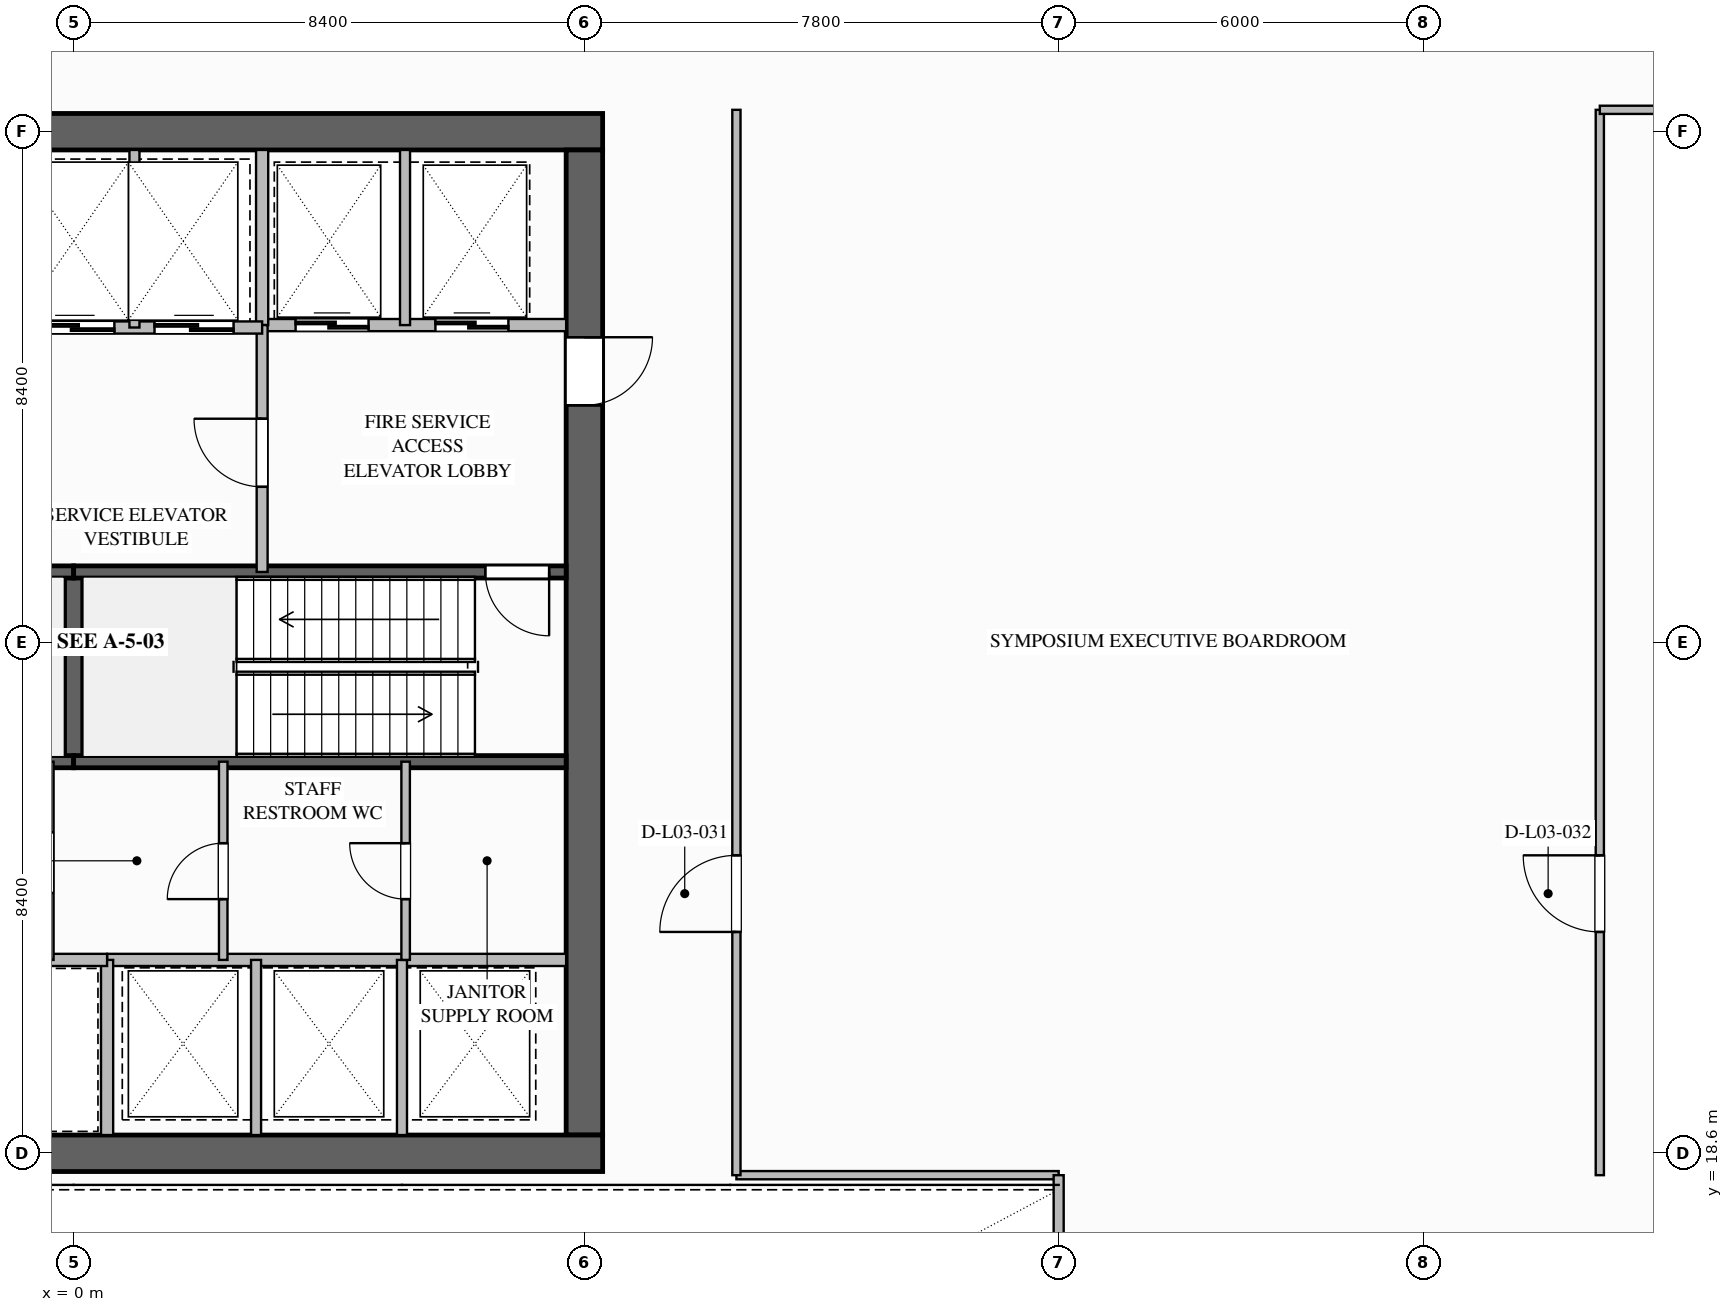
"""IFC4 building model, lengths in metres.
Left out: names, types, materials, properties, quantities, classifications, styles, units other than length and angle.
Written with IfcOpenShell. Run it as: python <this file> out.ifc"""

import sys

from ifc_helpers import new_model, si_unit, direction, frame, frame_2d, origin, place, context, subcontext, project, spatial, rectangle, extrude, element, fill, save


model = new_model("IFC4")
c1 = context("Model", 3, precision=1e-05, world=origin(), true_north=direction((0.0, 1.0)))
c2 = subcontext(c1, "Body", "Model", "MODEL_VIEW")
j1 = project(units=[si_unit("LENGTHUNIT", "METRE"), si_unit("PLANEANGLEUNIT", "RADIAN")], contexts=[c1])
p1 = place(None, origin())
s1 = spatial("IfcSite", under=j1, at=p1, CompositionType="ELEMENT")
p2 = place(p1, origin())
s2 = spatial("IfcBuilding", under=s1, at=p2, CompositionType="ELEMENT")
p3 = place(p2, frame((0.0, 0.0, 17.2)))
s3 = spatial("IfcBuildingStorey", under=s2, at=p3, CompositionType="ELEMENT", Elevation=17.2)
p4 = place(p3, frame((-8.7, 35.4, 0.0), z_axis=(0.0, 0.0, 1.0), x_axis=(1.0, 0.0, 0.0)))
e1 = element("IfcWall", 1, at=p4, inside=s3, PredefinedType="SHEAR", context=c2, shape_type="SweptSolid", body=[
    extrude(rectangle(XDim=17.4, YDim=0.6, at=frame_2d((8.7, 0.0))), origin(), (0.0, 0.0, 1.0), 5.2),
])
p5 = place(p3, frame((8.4, 35.1, 0.0), z_axis=(0.0, 0.0, 1.0), x_axis=(0.0, -1.0, 0.0)))
e2 = element("IfcWall", 2, at=p5, inside=s3, PredefinedType="SHEAR", context=c2, shape_type="SweptSolid", body=[
    extrude(rectangle(XDim=16.2, YDim=0.6, at=frame_2d((8.1, 0.0))), origin(), (0.0, 0.0, 1.0), 5.2),
])
p6 = place(p5, frame((3.08, 0.0, 0.0)))
e3 = element("IfcOpeningElement", 3, at=p6, cuts=e2, PredefinedType="OPENING", context=c2, shape_type="SweptSolid", body=[
    extrude(rectangle(XDim=1.12, YDim=2.1, at=frame_2d((0.56, 1.05))), frame((0.0, 0.31, 0.0), z_axis=(0.0, -1.0, 0.0), x_axis=(1.0, 0.0, 0.0)), (0.0, 0.0, 1.0), 0.62),
])
p7 = place(p3, frame((8.7, 18.6, 0.0), z_axis=(0.0, 0.0, 1.0), x_axis=(-1.0, 0.0, 0.0)))
e4 = element("IfcWall", 4, at=p7, inside=s3, PredefinedType="SHEAR", context=c2, shape_type="SweptSolid", body=[
    extrude(rectangle(XDim=17.4, YDim=0.6, at=frame_2d((8.7, 0.0))), origin(), (0.0, 0.0, 1.0), 5.2),
])
p8 = place(p3, frame((0.0, 25.04, 0.0), z_axis=(0.0, 0.0, 1.0), x_axis=(0.0, 1.0, 0.0)))
e5 = element("IfcWall", 5, at=p8, inside=s3, PredefinedType="SOLIDWALL", context=c2, shape_type="SweptSolid", body=[
    extrude(rectangle(XDim=3.12, YDim=0.3, at=frame_2d((1.56, 0.0))), origin(), (0.0, 0.0, 1.0), 4.9),
])
p9 = place(p3, frame((-8.1, 25.04, 0.0), z_axis=(0.0, 0.0, 1.0), x_axis=(1.0, 0.0, 0.0)))
e6 = element("IfcWall", 6, at=p9, inside=s3, PredefinedType="SOLIDWALL", context=c2, shape_type="SweptSolid", body=[
    extrude(rectangle(XDim=8.1, YDim=0.2, at=frame_2d((4.05, 0.0))), origin(), (0.0, 0.0, 1.0), 4.9),
])
p10 = place(p9, frame((0.28, 0.0, 0.0)))
e7 = element("IfcOpeningElement", 7, at=p10, cuts=e6, PredefinedType="OPENING", context=c2, shape_type="SweptSolid", body=[
    extrude(rectangle(XDim=1.05, YDim=2.1, at=frame_2d((0.525, 1.05))), frame((0.0, 0.11, 0.0), z_axis=(0.0, -1.0, 0.0), x_axis=(1.0, 0.0, 0.0)), (0.0, 0.0, 1.0), 0.22),
])
for number, where, z_axis, x_axis in (
    (8, (-8.1, 28.16, 0.0), (0.0, 0.0, 1.0), (1.0, 0.0, 0.0)),
    (9, (0.0, 25.04, 0.0), (0.0, 0.0, 1.0), (1.0, 0.0, 0.0)),
):
    element("IfcWall", number, at=place(p3, frame(where, z_axis=z_axis, x_axis=x_axis)), inside=s3, PredefinedType="SOLIDWALL", context=c2, shape_type="SweptSolid", body=[
        extrude(rectangle(XDim=8.1, YDim=0.2, at=frame_2d((4.05, 0.0))), origin(), (0.0, 0.0, 1.0), 4.9),
    ])
p11 = place(p3, frame((8.1, 28.16, 0.0), z_axis=(0.0, 0.0, 1.0), x_axis=(-1.0, 0.0, 0.0)))
e10 = element("IfcWall", 10, at=p11, inside=s3, PredefinedType="SOLIDWALL", context=c2, shape_type="SweptSolid", body=[
    extrude(rectangle(XDim=8.1, YDim=0.2, at=frame_2d((4.05, 0.0))), origin(), (0.0, 0.0, 1.0), 4.9),
])
p12 = place(p11, frame((0.28, 0.0, 0.0)))
e11 = element("IfcOpeningElement", 11, at=p12, cuts=e10, PredefinedType="OPENING", context=c2, shape_type="SweptSolid", body=[
    extrude(rectangle(XDim=1.05, YDim=2.1, at=frame_2d((0.525, 1.05))), frame((0.0, 0.11, 0.0), z_axis=(0.0, -1.0, 0.0), x_axis=(1.0, 0.0, 0.0)), (0.0, 0.0, 1.0), 0.22),
])
p13 = place(p3, frame((3.1, 32.22, 0.0), z_axis=(0.0, 0.0, 1.0), x_axis=(1.0, 0.0, 0.0)))
e12 = element("IfcWall", 12, at=p13, inside=s3, PredefinedType="SOLIDWALL", context=c2, shape_type="SweptSolid", body=[
    extrude(rectangle(XDim=5.0, YDim=0.2, at=frame_2d((2.5, 0.0))), origin(), (0.0, 0.0, 1.0), 4.9),
])
p14 = place(p13, frame((0.55, 0.0, 0.0)))
e13 = element("IfcOpeningElement", 13, at=p14, cuts=e12, PredefinedType="OPENING", context=c2, shape_type="SweptSolid", body=[
    extrude(rectangle(XDim=1.2, YDim=2.2, at=frame_2d((0.6, 1.1))), frame((0.0, 0.11, 0.0), z_axis=(0.0, -1.0, 0.0), x_axis=(1.0, 0.0, 0.0)), (0.0, 0.0, 1.0), 0.22),
])
p15 = place(p13, frame((2.85, 0.0, 0.0)))
e14 = element("IfcOpeningElement", 14, at=p15, cuts=e12, PredefinedType="OPENING", context=c2, shape_type="SweptSolid", body=[
    extrude(rectangle(XDim=1.2, YDim=2.2, at=frame_2d((0.6, 1.1))), frame((0.0, 0.11, 0.0), z_axis=(0.0, -1.0, 0.0), x_axis=(1.0, 0.0, 0.0)), (0.0, 0.0, 1.0), 0.22),
])
p16 = place(p3, frame((3.1, 32.22, 0.0), z_axis=(0.0, 0.0, 1.0), x_axis=(0.0, 1.0, 0.0)))
e15 = element("IfcWall", 15, at=p16, inside=s3, PredefinedType="SOLIDWALL", context=c2, shape_type="SweptSolid", body=[
    extrude(rectangle(XDim=2.88, YDim=0.2, at=frame_2d((1.44, 0.0))), origin(), (0.0, 0.0, 1.0), 4.9),
])
p17 = place(p3, frame((5.45, 32.22, 0.0), z_axis=(0.0, 0.0, 1.0), x_axis=(0.0, 1.0, 0.0)))
e16 = element("IfcWall", 16, at=p17, inside=s3, PredefinedType="PARTITIONING", context=c2, shape_type="SweptSolid", body=[
    extrude(rectangle(XDim=2.88, YDim=0.165, at=frame_2d((1.44, 0.0))), origin(), (0.0, 0.0, 1.0), 4.9),
])
p18 = place(p3, frame((3.1, 28.16, 0.0), z_axis=(0.0, 0.0, 1.0), x_axis=(0.0, 1.0, 0.0)))
e17 = element("IfcWall", 17, at=p18, inside=s3, PredefinedType="SOLIDWALL", context=c2, shape_type="SweptSolid", body=[
    extrude(rectangle(XDim=4.06, YDim=0.18, at=frame_2d((2.03, 0.0))), origin(), (0.0, 0.0, 1.0), 4.9),
])
p19 = place(p18, frame((1.4, 0.0, 0.0)))
e18 = element("IfcOpeningElement", 18, at=p19, cuts=e17, PredefinedType="OPENING", context=c2, shape_type="SweptSolid", body=[
    extrude(rectangle(XDim=1.12, YDim=2.1, at=frame_2d((0.56, 1.05))), frame((0.0, 0.1, 0.0), z_axis=(0.0, -1.0, 0.0), x_axis=(1.0, 0.0, 0.0)), (0.0, 0.0, 1.0), 0.2),
])
p20 = place(p3, frame((-1.0, 32.18, 0.0), z_axis=(0.0, 0.0, 1.0), x_axis=(1.0, 0.0, 0.0)))
e19 = element("IfcWall", 19, at=p20, inside=s3, PredefinedType="SOLIDWALL", context=c2, shape_type="SweptSolid", body=[
    extrude(rectangle(XDim=4.1, YDim=0.2, at=frame_2d((2.05, 0.0))), origin(), (0.0, 0.0, 1.0), 4.9),
])
p21 = place(p20, frame((0.37, 0.0, 0.0)))
e20 = element("IfcOpeningElement", 20, at=p21, cuts=e19, PredefinedType="OPENING", context=c2, shape_type="SweptSolid", body=[
    extrude(rectangle(XDim=1.3, YDim=2.2, at=frame_2d((0.65, 1.1))), frame((0.0, 0.11, 0.0), z_axis=(0.0, -1.0, 0.0), x_axis=(1.0, 0.0, 0.0)), (0.0, 0.0, 1.0), 0.22),
])
p22 = place(p20, frame((2.33, 0.0, 0.0)))
e21 = element("IfcOpeningElement", 21, at=p22, cuts=e19, PredefinedType="OPENING", context=c2, shape_type="SweptSolid", body=[
    extrude(rectangle(XDim=1.3, YDim=2.2, at=frame_2d((0.65, 1.1))), frame((0.0, 0.11, 0.0), z_axis=(0.0, -1.0, 0.0), x_axis=(1.0, 0.0, 0.0)), (0.0, 0.0, 1.0), 0.22),
])
p23 = place(p3, frame((1.0, 32.18, 0.0), z_axis=(0.0, 0.0, 1.0), x_axis=(0.0, 1.0, 0.0)))
e22 = element("IfcWall", 22, at=p23, inside=s3, PredefinedType="PARTITIONING", context=c2, shape_type="SweptSolid", body=[
    extrude(rectangle(XDim=2.92, YDim=0.165, at=frame_2d((1.46, 0.0))), origin(), (0.0, 0.0, 1.0), 4.9),
])
p24 = place(p3, frame((8.1, 21.78, 0.0), z_axis=(0.0, 0.0, 1.0), x_axis=(-1.0, 0.0, 0.0)))
e23 = element("IfcWall", 23, at=p24, inside=s3, PredefinedType="SOLIDWALL", context=c2, shape_type="SweptSolid", body=[
    extrude(rectangle(XDim=7.55, YDim=0.2, at=frame_2d((3.775, 0.0))), origin(), (0.0, 0.0, 1.0), 4.9),
])
p25 = place(p3, frame((0.55, 18.9, 0.0), z_axis=(0.0, 0.0, 1.0), x_axis=(0.0, 1.0, 0.0)))
e24 = element("IfcWall", 24, at=p25, inside=s3, PredefinedType="SOLIDWALL", context=c2, shape_type="SweptSolid", body=[
    extrude(rectangle(XDim=2.88, YDim=0.2, at=frame_2d((1.44, 0.0))), origin(), (0.0, 0.0, 1.0), 4.9),
])
for number, where, z_axis, x_axis in (
    (25, (3.0, 18.9, 0.0), (0.0, 0.0, 1.0), (0.0, 1.0, 0.0)),
    (26, (5.4, 18.9, 0.0), (0.0, 0.0, 1.0), (0.0, 1.0, 0.0)),
):
    element("IfcWall", number, at=place(p3, frame(where, z_axis=z_axis, x_axis=x_axis)), inside=s3, PredefinedType="PARTITIONING", context=c2, shape_type="SweptSolid", body=[
        extrude(rectangle(XDim=2.88, YDim=0.165, at=frame_2d((1.44, 0.0))), origin(), (0.0, 0.0, 1.0), 4.9),
    ])
p26 = place(p3, frame((-0.55, 21.78, 0.0), z_axis=(0.0, 0.0, 1.0), x_axis=(1.0, 0.0, 0.0)))
e27 = element("IfcWall", 27, at=p26, inside=s3, PredefinedType="SOLIDWALL", context=c2, shape_type="SweptSolid", body=[
    extrude(rectangle(XDim=1.1, YDim=0.2, at=frame_2d((0.55, 0.0))), origin(), (0.0, 0.0, 1.0), 4.9),
])
p27 = place(p3, frame((-0.42, 21.78, 0.0), z_axis=(0.0, 0.0, 1.0), x_axis=(0.0, 1.0, 0.0)))
e28 = element("IfcWall", 28, at=p27, inside=s3, PredefinedType="SOLIDWALL", context=c2, shape_type="SweptSolid", body=[
    extrude(rectangle(XDim=3.26, YDim=0.18, at=frame_2d((1.63, 0.0))), origin(), (0.0, 0.0, 1.0), 4.9),
])
p28 = place(p27, frame((1.1, 0.0, 0.0)))
e29 = element("IfcOpeningElement", 29, at=p28, cuts=e28, PredefinedType="OPENING", context=c2, shape_type="SweptSolid", body=[
    extrude(rectangle(XDim=1.0, YDim=2.1, at=frame_2d((0.5, 1.05))), frame((0.0, 0.1, 0.0), z_axis=(0.0, -1.0, 0.0), x_axis=(1.0, 0.0, 0.0)), (0.0, 0.0, 1.0), 0.2),
])
p29 = place(p3, frame((2.46, 21.78, 0.0), z_axis=(0.0, 0.0, 1.0), x_axis=(0.0, 1.0, 0.0)))
e30 = element("IfcWall", 30, at=p29, inside=s3, PredefinedType="PLUMBINGWALL", context=c2, shape_type="SweptSolid", body=[
    extrude(rectangle(XDim=3.26, YDim=0.14, at=frame_2d((1.63, 0.0))), origin(), (0.0, 0.0, 1.0), 4.9),
])
p30 = place(p29, frame((1.0, 0.0, 0.0)))
e31 = element("IfcOpeningElement", 31, at=p30, cuts=e30, PredefinedType="OPENING", context=c2, shape_type="SweptSolid", body=[
    extrude(rectangle(XDim=0.92, YDim=2.1, at=frame_2d((0.46, 1.05))), frame((0.0, 0.08, 0.0), z_axis=(0.0, -1.0, 0.0), x_axis=(1.0, 0.0, 0.0)), (0.0, 0.0, 1.0), 0.16),
])
p31 = place(p3, frame((5.46, 21.78, 0.0), z_axis=(0.0, 0.0, 1.0), x_axis=(0.0, 1.0, 0.0)))
e32 = element("IfcWall", 32, at=p31, inside=s3, PredefinedType="PLUMBINGWALL", context=c2, shape_type="SweptSolid", body=[
    extrude(rectangle(XDim=3.26, YDim=0.14, at=frame_2d((1.63, 0.0))), origin(), (0.0, 0.0, 1.0), 4.9),
])
p32 = place(p31, frame((1.0, 0.0, 0.0)))
e33 = element("IfcOpeningElement", 33, at=p32, cuts=e32, PredefinedType="OPENING", context=c2, shape_type="SweptSolid", body=[
    extrude(rectangle(XDim=0.92, YDim=2.1, at=frame_2d((0.46, 1.05))), frame((0.0, 0.08, 0.0), z_axis=(0.0, -1.0, 0.0), x_axis=(1.0, 0.0, 0.0)), (0.0, 0.0, 1.0), 0.16),
])
p33 = place(p3, frame((10.9, 18.24, 0.0), z_axis=(0.0, 0.0, 1.0), x_axis=(1.0, 0.0, 0.0)))
e34 = element("IfcWall", 34, at=p33, inside=s3, PredefinedType="PARTITIONING", context=c2, shape_type="SweptSolid", body=[
    extrude(rectangle(XDim=5.3, YDim=0.135, at=frame_2d((2.65, 0.0))), origin(), (0.0, 0.0, 1.0), 4.9),
])
p34 = place(p3, frame((10.9, 18.24, 0.0), z_axis=(0.0, 0.0, 1.0), x_axis=(0.0, 1.0, 0.0)))
e35 = element("IfcWall", 35, at=p34, inside=s3, PredefinedType="PARTITIONING", context=c2, shape_type="SweptSolid", body=[
    extrude(rectangle(XDim=17.52, YDim=0.135, at=frame_2d((8.76, 0.0))), origin(), (0.0, 0.0, 1.0), 4.9),
])
p35 = place(p34, frame((4.0, 0.0, 0.0)))
e36 = element("IfcOpeningElement", 36, at=p35, cuts=e35, PredefinedType="OPENING", context=c2, shape_type="SweptSolid", body=[
    extrude(rectangle(XDim=1.26, YDim=2.2, at=frame_2d((0.63, 1.1))), frame((0.0, 0.077, 0.0), z_axis=(0.0, -1.0, 0.0), x_axis=(1.0, 0.0, 0.0)), (0.0, 0.0, 1.0), 0.155),
])
p36 = place(p3, frame((25.1, 18.24, 0.0), z_axis=(0.0, 0.0, 1.0), x_axis=(0.0, 1.0, 0.0)))
e37 = element("IfcWall", 37, at=p36, inside=s3, PredefinedType="PARTITIONING", context=c2, shape_type="SweptSolid", body=[
    extrude(rectangle(XDim=17.52, YDim=0.135, at=frame_2d((8.76, 0.0))), origin(), (0.0, 0.0, 1.0), 4.9),
])
p37 = place(p36, frame((4.0, 0.0, 0.0)))
e38 = element("IfcOpeningElement", 38, at=p37, cuts=e37, PredefinedType="OPENING", context=c2, shape_type="SweptSolid", body=[
    extrude(rectangle(XDim=1.26, YDim=2.2, at=frame_2d((0.63, 1.1))), frame((0.0, 0.077, 0.0), z_axis=(0.0, -1.0, 0.0), x_axis=(1.0, 0.0, 0.0)), (0.0, 0.0, 1.0), 0.155),
])
p38 = place(p3, frame((25.1, 35.76, 0.0), z_axis=(0.0, 0.0, 1.0), x_axis=(1.0, 0.0, 0.0)))
e39 = element("IfcWall", 39, at=p38, inside=s3, PredefinedType="PARTITIONING", context=c2, shape_type="SweptSolid", body=[
    extrude(rectangle(XDim=2.45, YDim=0.135, at=frame_2d((1.225, 0.0))), origin(), (0.0, 0.0, 1.0), 4.9),
])
p39 = place(p3, frame((16.2, 0.8, 0.0), z_axis=(0.0, 0.0, 1.0), x_axis=(0.0, 1.0, 0.0)))
e40 = element("IfcWall", 40, at=p39, inside=s3, PredefinedType="PARTITIONING", context=c2, shape_type="SweptSolid", body=[
    extrude(rectangle(XDim=17.44, YDim=0.165, at=frame_2d((8.72, 0.0))), origin(), (0.0, 0.0, 1.0), 3.937),
])
p40 = place(p12, origin())
e41 = element("IfcDoor", 41, at=p40, inside=s3, OperationType="SINGLE_SWING_LEFT", PredefinedType="DOOR", context=c2, shape_type="SweptSolid", body=[
    extrude(rectangle(XDim=1.05, YDim=2.1, at=frame_2d((0.525, 1.05))), frame((0.0, 0.025, 0.0), z_axis=(0.0, -1.0, 0.0), x_axis=(1.0, 0.0, 0.0)), (0.0, 0.0, 1.0), 0.05),
])
fill(e11, e41)
p41 = place(p14, origin())
e42 = element("IfcDoor", 42, at=p41, inside=s3, OperationType="SLIDING_TO_LEFT", PredefinedType="DOOR", context=c2, shape_type="SweptSolid", body=[
    extrude(rectangle(XDim=1.2, YDim=2.2, at=frame_2d((0.6, 1.1))), frame((0.0, 0.025, 0.0), z_axis=(0.0, -1.0, 0.0), x_axis=(1.0, 0.0, 0.0)), (0.0, 0.0, 1.0), 0.05),
])
fill(e13, e42)
p42 = place(p15, origin())
e43 = element("IfcDoor", 43, at=p42, inside=s3, OperationType="SLIDING_TO_LEFT", PredefinedType="DOOR", context=c2, shape_type="SweptSolid", body=[
    extrude(rectangle(XDim=1.2, YDim=2.2, at=frame_2d((0.6, 1.1))), frame((0.0, 0.025, 0.0), z_axis=(0.0, -1.0, 0.0), x_axis=(1.0, 0.0, 0.0)), (0.0, 0.0, 1.0), 0.05),
])
fill(e14, e43)
p43 = place(p19, origin())
e44 = element("IfcDoor", 44, at=p43, inside=s3, OperationType="SINGLE_SWING_RIGHT", PredefinedType="DOOR", context=c2, shape_type="SweptSolid", body=[
    extrude(rectangle(XDim=1.12, YDim=2.1, at=frame_2d((0.56, 1.05))), frame((0.0, 0.025, 0.0), z_axis=(0.0, -1.0, 0.0), x_axis=(1.0, 0.0, 0.0)), (0.0, 0.0, 1.0), 0.05),
])
fill(e18, e44)
p44 = place(p6, origin())
e45 = element("IfcDoor", 45, at=p44, inside=s3, OperationType="SINGLE_SWING_LEFT", PredefinedType="DOOR", context=c2, shape_type="SweptSolid", body=[
    extrude(rectangle(XDim=1.12, YDim=2.1, at=frame_2d((0.56, 1.05))), frame((0.0, 0.025, 0.0), z_axis=(0.0, -1.0, 0.0), x_axis=(1.0, 0.0, 0.0)), (0.0, 0.0, 1.0), 0.05),
])
fill(e3, e45)
p45 = place(p21, origin())
e46 = element("IfcDoor", 46, at=p45, inside=s3, OperationType="SLIDING_TO_LEFT", PredefinedType="DOOR", context=c2, shape_type="SweptSolid", body=[
    extrude(rectangle(XDim=1.3, YDim=2.2, at=frame_2d((0.65, 1.1))), frame((0.0, 0.025, 0.0), z_axis=(0.0, -1.0, 0.0), x_axis=(1.0, 0.0, 0.0)), (0.0, 0.0, 1.0), 0.05),
])
fill(e20, e46)
p46 = place(p22, origin())
e47 = element("IfcDoor", 47, at=p46, inside=s3, OperationType="SLIDING_TO_LEFT", PredefinedType="DOOR", context=c2, shape_type="SweptSolid", body=[
    extrude(rectangle(XDim=1.3, YDim=2.2, at=frame_2d((0.65, 1.1))), frame((0.0, 0.025, 0.0), z_axis=(0.0, -1.0, 0.0), x_axis=(1.0, 0.0, 0.0)), (0.0, 0.0, 1.0), 0.05),
])
fill(e21, e47)
p47 = place(p30, origin())
e48 = element("IfcDoor", 48, at=p47, inside=s3, OperationType="SINGLE_SWING_LEFT", PredefinedType="DOOR", context=c2, shape_type="SweptSolid", body=[
    extrude(rectangle(XDim=0.92, YDim=2.1, at=frame_2d((0.46, 1.05))), frame((0.0, 0.025, 0.0), z_axis=(0.0, -1.0, 0.0), x_axis=(1.0, 0.0, 0.0)), (0.0, 0.0, 1.0), 0.05),
])
fill(e31, e48)
p48 = place(p32, origin())
e49 = element("IfcDoor", 49, at=p48, inside=s3, OperationType="SINGLE_SWING_RIGHT", PredefinedType="DOOR", context=c2, shape_type="SweptSolid", body=[
    extrude(rectangle(XDim=0.92, YDim=2.1, at=frame_2d((0.46, 1.05))), frame((0.0, 0.025, 0.0), z_axis=(0.0, -1.0, 0.0), x_axis=(1.0, 0.0, 0.0)), (0.0, 0.0, 1.0), 0.05),
])
fill(e33, e49)
p49 = place(p35, origin())
e50 = element("IfcDoor", 50, at=p49, inside=s3, OperationType="SINGLE_SWING_LEFT", PredefinedType="DOOR", context=c2, shape_type="SweptSolid", body=[
    extrude(rectangle(XDim=1.26, YDim=2.2, at=frame_2d((0.63, 1.1))), frame((0.0, 0.025, 0.0), z_axis=(0.0, -1.0, 0.0), x_axis=(1.0, 0.0, 0.0)), (0.0, 0.0, 1.0), 0.05),
])
fill(e36, e50)
p50 = place(p37, origin())
e51 = element("IfcDoor", 51, at=p50, inside=s3, OperationType="SINGLE_SWING_RIGHT", PredefinedType="DOOR", context=c2, shape_type="SweptSolid", body=[
    extrude(rectangle(XDim=1.26, YDim=2.2, at=frame_2d((0.63, 1.1))), frame((0.0, 0.025, 0.0), z_axis=(0.0, -1.0, 0.0), x_axis=(1.0, 0.0, 0.0)), (0.0, 0.0, 1.0), 0.05),
])
fill(e38, e51)
save(model, sys.argv[1])
